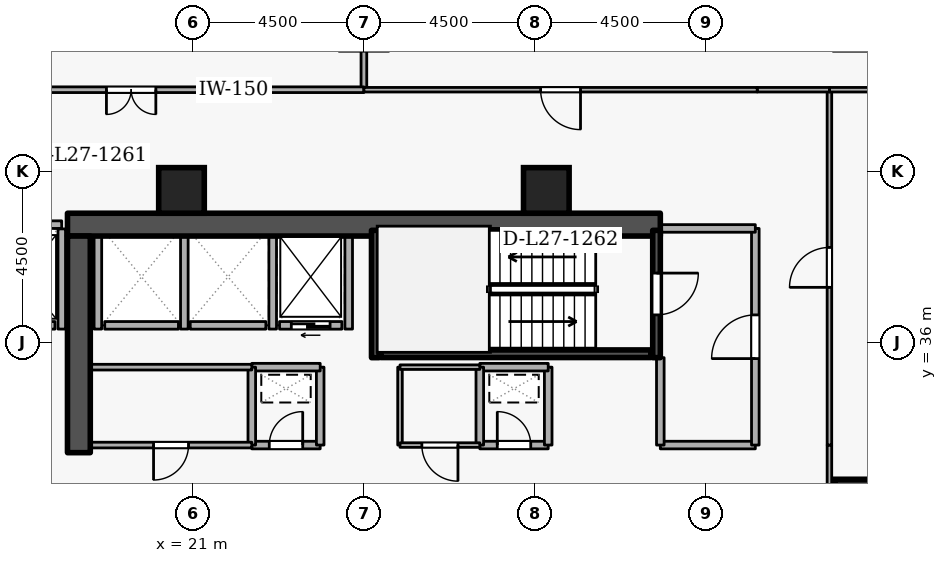
"""IFC4 building model, lengths in metres.
Left out: names, types, materials, properties, quantities, classifications, styles, units other than length and angle.
Written with IfcOpenShell. Run it as: python <this file> out.ifc"""

import sys

from ifc_helpers import new_model, si_unit, direction, frame, frame_2d, origin, origin_2d, place, context, subcontext, project, spatial, rectangle, extrude, element, fill, save


model = new_model("IFC4")
c1 = context("Model", 3, precision=1e-05, world=origin(), true_north=direction((0.0, 1.0)))
c2 = subcontext(c1, "Body", "Model", "MODEL_VIEW")
j1 = project(units=[si_unit("LENGTHUNIT", "METRE"), si_unit("PLANEANGLEUNIT", "RADIAN")], contexts=[c1])
p1 = place(None, origin())
s1 = spatial("IfcSite", under=j1, at=p1, CompositionType="ELEMENT")
p2 = place(p1, origin())
s2 = spatial("IfcBuilding", under=s1, at=p2, CompositionType="ELEMENT")
p3 = place(p2, frame((0.0, 0.0, 105.3)))
s3 = spatial("IfcBuildingStorey", under=s2, at=p3, CompositionType="ELEMENT", Elevation=105.3)
p4 = place(p3, frame((17.7, 39.1, 0.0), z_axis=(0.0, 0.0, 1.0), x_axis=(1.0, 0.0, 0.0)))
e1 = element("IfcWall", 1, at=p4, inside=s3, PredefinedType="SHEAR", context=c2, shape_type="SweptSolid", body=[
    extrude(rectangle(XDim=15.6, YDim=0.6, at=frame_2d((7.8, 0.0))), origin(), (0.0, 0.0, 1.0), 3.6),
])
p5 = place(p3, frame((18.0, 33.1, 0.0), z_axis=(0.0, 0.0, 1.0), x_axis=(0.0, 1.0, 0.0)))
e2 = element("IfcWall", 2, at=p5, inside=s3, PredefinedType="SHEAR", context=c2, shape_type="SweptSolid", body=[
    extrude(rectangle(XDim=5.7, YDim=0.6, at=frame_2d((2.85, 0.0))), origin(), (0.0, 0.0, 1.0), 3.6),
])
for number, where, z_axis, x_axis in (
    (3, (38.5, 31.8, 0.0), (0.0, 0.0, 1.0), (1.0, 0.0, 0.0)),
    (4, (20.7, 40.0, 0.0), (0.0, 0.0, 1.0), (1.0, 0.0, 0.0)),
    (5, (30.3, 40.0, 0.0), (0.0, 0.0, 1.0), (1.0, 0.0, 0.0)),
):
    element("IfcColumn", number, at=place(p3, frame(where, z_axis=z_axis, x_axis=x_axis)), inside=s3, PredefinedType="COLUMN", context=c2, shape_type="SweptSolid", body=[
        extrude(rectangle(XDim=1.2, YDim=1.2, at=origin_2d()), origin(), (0.0, 0.0, 1.0), 3.6),
    ])
p6 = place(p3, frame((24.92, 36.45, 0.0), z_axis=(0.0, 0.0, 1.0), x_axis=(-1.0, 0.0, 0.0)))
e6 = element("IfcWall", 6, at=p6, inside=s3, PredefinedType="STANDARD", context=c2, shape_type="SweptSolid", body=[
    extrude(rectangle(XDim=1.64, YDim=0.2, at=frame_2d((0.82, 0.0))), origin(), (0.0, 0.0, 1.0), 3.34),
])
p7 = place(p6, frame((0.31, 0.0, 0.0)))
e7 = element("IfcOpeningElement", 7, at=p7, cuts=e6, PredefinedType="OPENING", context=c2, shape_type="SweptSolid", body=[
    extrude(rectangle(XDim=1.02, YDim=2.06, at=frame_2d((0.51, 1.03))), frame((0.0, 0.11, 0.0), z_axis=(0.0, -1.0, 0.0), x_axis=(1.0, 0.0, 0.0)), (0.0, 0.0, 1.0), 0.22),
])
p8 = place(p3, frame((22.92, 36.45, 0.0), z_axis=(0.0, 0.0, 1.0), x_axis=(-1.0, 0.0, 0.0)))
e8 = element("IfcWall", 8, at=p8, inside=s3, PredefinedType="STANDARD", context=c2, shape_type="SweptSolid", body=[
    extrude(rectangle(XDim=1.99, YDim=0.2, at=frame_2d((0.995, 0.0))), origin(), (0.0, 0.0, 1.0), 3.34),
])
p9 = place(p3, frame((20.62, 36.45, 0.0), z_axis=(0.0, 0.0, 1.0), x_axis=(-1.0, 0.0, 0.0)))
e9 = element("IfcWall", 9, at=p9, inside=s3, PredefinedType="STANDARD", context=c2, shape_type="SweptSolid", body=[
    extrude(rectangle(XDim=1.94, YDim=0.2, at=frame_2d((0.97, 0.0))), origin(), (0.0, 0.0, 1.0), 3.34),
])
p10 = place(p3, frame((17.37, 36.45, 0.0), z_axis=(0.0, 0.0, 1.0), x_axis=(-1.0, 0.0, 0.0)))
e10 = element("IfcWall", 10, at=p10, inside=s3, PredefinedType="STANDARD", context=c2, shape_type="SweptSolid", body=[
    extrude(rectangle(XDim=1.74, YDim=0.2, at=frame_2d((0.87, 0.0))), origin(), (0.0, 0.0, 1.0), 3.34),
])
p11 = place(p10, frame((0.36, 0.0, 0.0)))
e11 = element("IfcOpeningElement", 11, at=p11, cuts=e10, PredefinedType="OPENING", context=c2, shape_type="SweptSolid", body=[
    extrude(rectangle(XDim=1.02, YDim=2.06, at=frame_2d((0.51, 1.03))), frame((0.0, 0.11, 0.0), z_axis=(0.0, -1.0, 0.0), x_axis=(1.0, 0.0, 0.0)), (0.0, 0.0, 1.0), 0.22),
])
for number, where, z_axis, x_axis in (
    (12, (25.1, 36.352, 0.0), (0.0, 0.0, 1.0), (0.0, 1.0, 0.0)),
    (13, (23.1, 36.352, 0.0), (0.0, 0.0, 1.0), (0.0, 1.0, 0.0)),
    (14, (20.775, 36.352, 0.0), (0.0, 0.0, 1.0), (0.0, 1.0, 0.0)),
    (15, (18.5, 36.352, 0.0), (0.0, 0.0, 1.0), (0.0, 1.0, 0.0)),
):
    element("IfcWall", number, at=place(p3, frame(where, z_axis=z_axis, x_axis=x_axis)), inside=s3, PredefinedType="STANDARD", context=c2, shape_type="SweptSolid", body=[
        extrude(rectangle(XDim=2.436, YDim=0.2, at=frame_2d((1.218, 0.0))), origin(), (0.0, 0.0, 1.0), 3.34),
    ])
p12 = place(p3, frame((13.352, 39.1, 0.0), z_axis=(0.0, 0.0, 1.0), x_axis=(1.0, 0.0, 0.0)))
e16 = element("IfcWall", 16, at=p12, inside=s3, PredefinedType="STANDARD", context=c2, shape_type="SweptSolid", body=[
    extrude(rectangle(XDim=4.196, YDim=0.2, at=frame_2d((2.098, 0.0))), origin(), (0.0, 0.0, 1.0), 3.34),
])
p13 = place(p3, frame((17.55, 36.352, 0.0), z_axis=(0.0, 0.0, 1.0), x_axis=(0.0, 1.0, 0.0)))
e17 = element("IfcWall", 17, at=p13, inside=s3, PredefinedType="STANDARD", context=c2, shape_type="SweptSolid", body=[
    extrude(rectangle(XDim=2.636, YDim=0.2, at=frame_2d((1.318, 0.0))), origin(), (0.0, 0.0, 1.0), 2.545),
])
p14 = place(p3, frame((33.2, 38.95, 0.0), z_axis=(0.0, 0.0, 1.0), x_axis=(0.0, -1.0, 0.0)))
e18 = element("IfcWall", 18, at=p14, inside=s3, PredefinedType="SHEAR", context=c2, shape_type="SweptSolid", body=[
    extrude(rectangle(XDim=3.35, YDim=0.2, at=frame_2d((1.675, 0.0))), origin(), (0.0, 0.0, 1.0), 3.6),
])
p15 = place(p14, frame((1.125, 0.0, 0.0)))
e19 = element("IfcOpeningElement", 19, at=p15, cuts=e18, PredefinedType="OPENING", context=c2, shape_type="SweptSolid", body=[
    extrude(rectangle(XDim=1.1, YDim=2.1, at=frame_2d((0.55, 1.05))), frame((0.0, 0.11, 0.0), z_axis=(0.0, -1.0, 0.0), x_axis=(1.0, 0.0, 0.0)), (0.0, 0.0, 1.0), 0.22),
])
p16 = place(p3, frame((25.8, 35.6, 0.0), z_axis=(0.0, 0.0, 1.0), x_axis=(0.0, 1.0, 0.0)))
e20 = element("IfcWall", 20, at=p16, inside=s3, PredefinedType="SHEAR", context=c2, shape_type="SweptSolid", body=[
    extrude(rectangle(XDim=3.35, YDim=0.2, at=frame_2d((1.675, 0.0))), origin(), (0.0, 0.0, 1.0), 3.6),
])
p17 = place(p3, frame((25.95, 35.703, 0.0), z_axis=(0.0, 0.0, 1.0), x_axis=(1.0, 0.0, 0.0)))
e21 = element("IfcWall", 21, at=p17, inside=s3, PredefinedType="SHEAR", context=c2, shape_type="SweptSolid", body=[
    extrude(rectangle(XDim=7.1, YDim=0.2, at=frame_2d((3.55, 0.0))), origin(), (0.0, 0.0, 1.0), 3.6),
])
p18 = place(p3, frame((33.3, 33.3, 0.0), z_axis=(0.0, 0.0, 1.0), x_axis=(1.0, 0.0, 0.0)))
e22 = element("IfcWall", 22, at=p18, inside=s3, PredefinedType="STANDARD", context=c2, shape_type="SweptSolid", body=[
    extrude(rectangle(XDim=2.5, YDim=0.2, at=frame_2d((1.25, 0.0))), origin(), (0.0, 0.0, 1.0), 3.34),
])
p19 = place(p3, frame((35.8, 33.3, 0.0), z_axis=(0.0, 0.0, 1.0), x_axis=(0.0, 1.0, 0.0)))
e23 = element("IfcWall", 23, at=p19, inside=s3, PredefinedType="STANDARD", context=c2, shape_type="SweptSolid", body=[
    extrude(rectangle(XDim=5.7, YDim=0.2, at=frame_2d((2.85, 0.0))), origin(), (0.0, 0.0, 1.0), 3.34),
])
p20 = place(p19, frame((2.275, 0.0, 0.0)))
e24 = element("IfcOpeningElement", 24, at=p20, cuts=e23, PredefinedType="OPENING", context=c2, shape_type="SweptSolid", body=[
    extrude(rectangle(XDim=1.15, YDim=2.1, at=frame_2d((0.575, 1.05))), frame((0.0, 0.11, 0.0), z_axis=(0.0, -1.0, 0.0), x_axis=(1.0, 0.0, 0.0)), (0.0, 0.0, 1.0), 0.22),
])
p21 = place(p3, frame((35.8, 39.0, 0.0), z_axis=(0.0, 0.0, 1.0), x_axis=(-1.0, 0.0, 0.0)))
e25 = element("IfcWall", 25, at=p21, inside=s3, PredefinedType="STANDARD", context=c2, shape_type="SweptSolid", body=[
    extrude(rectangle(XDim=2.5, YDim=0.2, at=frame_2d((1.25, 0.0))), origin(), (0.0, 0.0, 1.0), 3.34),
])
p22 = place(p3, frame((33.3, 35.6, 0.0), z_axis=(0.0, 0.0, 1.0), x_axis=(0.0, -1.0, 0.0)))
e26 = element("IfcWall", 26, at=p22, inside=s3, PredefinedType="STANDARD", context=c2, shape_type="SweptSolid", body=[
    extrude(rectangle(XDim=2.3, YDim=0.2, at=frame_2d((1.15, 0.0))), origin(), (0.0, 0.0, 1.0), 2.545),
])
p23 = place(p3, frame((22.55, 33.3, 0.0), z_axis=(0.0, 0.0, 1.0), x_axis=(1.0, 0.0, 0.0)))
e27 = element("IfcWall", 27, at=p23, inside=s3, PredefinedType="STANDARD", context=c2, shape_type="SweptSolid", body=[
    extrude(rectangle(XDim=1.8, YDim=0.2, at=frame_2d((0.9, 0.0))), origin(), (0.0, 0.0, 1.0), 3.34),
])
p24 = place(p23, frame((0.46, 0.0, 0.0)))
e28 = element("IfcOpeningElement", 28, at=p24, cuts=e27, PredefinedType="OPENING", context=c2, shape_type="SweptSolid", body=[
    extrude(rectangle(XDim=0.88, YDim=2.04, at=frame_2d((0.44, 1.02))), frame((0.0, 0.11, 0.0), z_axis=(0.0, -1.0, 0.0), x_axis=(1.0, 0.0, 0.0)), (0.0, 0.0, 1.0), 0.22),
])
p25 = place(p3, frame((24.35, 33.3, 0.0), z_axis=(0.0, 0.0, 1.0), x_axis=(0.0, 1.0, 0.0)))
e29 = element("IfcWall", 29, at=p25, inside=s3, PredefinedType="STANDARD", context=c2, shape_type="SweptSolid", body=[
    extrude(rectangle(XDim=2.05, YDim=0.2, at=frame_2d((1.025, 0.0))), origin(), (0.0, 0.0, 1.0), 3.34),
])
p26 = place(p3, frame((24.35, 35.35, 0.0), z_axis=(0.0, 0.0, 1.0), x_axis=(-1.0, 0.0, 0.0)))
e30 = element("IfcWall", 30, at=p26, inside=s3, PredefinedType="STANDARD", context=c2, shape_type="SweptSolid", body=[
    extrude(rectangle(XDim=1.8, YDim=0.2, at=frame_2d((0.9, 0.0))), origin(), (0.0, 0.0, 1.0), 3.34),
])
p27 = place(p3, frame((22.55, 35.35, 0.0), z_axis=(0.0, 0.0, 1.0), x_axis=(0.0, -1.0, 0.0)))
e31 = element("IfcWall", 31, at=p27, inside=s3, PredefinedType="STANDARD", context=c2, shape_type="SweptSolid", body=[
    extrude(rectangle(XDim=2.05, YDim=0.2, at=frame_2d((1.025, 0.0))), origin(), (0.0, 0.0, 1.0), 3.34),
])
p28 = place(p3, frame((28.55, 33.3, 0.0), z_axis=(0.0, 0.0, 1.0), x_axis=(1.0, 0.0, 0.0)))
e32 = element("IfcWall", 32, at=p28, inside=s3, PredefinedType="STANDARD", context=c2, shape_type="SweptSolid", body=[
    extrude(rectangle(XDim=1.8, YDim=0.2, at=frame_2d((0.9, 0.0))), origin(), (0.0, 0.0, 1.0), 3.34),
])
p29 = place(p28, frame((0.46, 0.0, 0.0)))
e33 = element("IfcOpeningElement", 33, at=p29, cuts=e32, PredefinedType="OPENING", context=c2, shape_type="SweptSolid", body=[
    extrude(rectangle(XDim=0.88, YDim=2.04, at=frame_2d((0.44, 1.02))), frame((0.0, 0.11, 0.0), z_axis=(0.0, -1.0, 0.0), x_axis=(1.0, 0.0, 0.0)), (0.0, 0.0, 1.0), 0.22),
])
p30 = place(p3, frame((30.35, 33.3, 0.0), z_axis=(0.0, 0.0, 1.0), x_axis=(0.0, 1.0, 0.0)))
e34 = element("IfcWall", 34, at=p30, inside=s3, PredefinedType="STANDARD", context=c2, shape_type="SweptSolid", body=[
    extrude(rectangle(XDim=2.05, YDim=0.2, at=frame_2d((1.025, 0.0))), origin(), (0.0, 0.0, 1.0), 3.34),
])
p31 = place(p3, frame((30.35, 35.35, 0.0), z_axis=(0.0, 0.0, 1.0), x_axis=(-1.0, 0.0, 0.0)))
e35 = element("IfcWall", 35, at=p31, inside=s3, PredefinedType="STANDARD", context=c2, shape_type="SweptSolid", body=[
    extrude(rectangle(XDim=1.8, YDim=0.2, at=frame_2d((0.9, 0.0))), origin(), (0.0, 0.0, 1.0), 3.34),
])
p32 = place(p3, frame((28.55, 35.35, 0.0), z_axis=(0.0, 0.0, 1.0), x_axis=(0.0, -1.0, 0.0)))
e36 = element("IfcWall", 36, at=p32, inside=s3, PredefinedType="STANDARD", context=c2, shape_type="SweptSolid", body=[
    extrude(rectangle(XDim=2.05, YDim=0.2, at=frame_2d((1.025, 0.0))), origin(), (0.0, 0.0, 1.0), 3.34),
])
p33 = place(p3, frame((18.3, 35.35, 0.0), z_axis=(0.0, 0.0, 1.0), x_axis=(1.0, 0.0, 0.0)))
e37 = element("IfcWall", 37, at=p33, inside=s3, PredefinedType="PARTITIONING", context=c2, shape_type="SweptSolid", body=[
    extrude(rectangle(XDim=4.25, YDim=0.15, at=frame_2d((2.125, 0.0))), origin(), (0.0, 0.0, 1.0), 3.34),
])
p34 = place(p3, frame((22.55, 33.3, 0.0), z_axis=(0.0, 0.0, 1.0), x_axis=(-1.0, 0.0, 0.0)))
e38 = element("IfcWall", 38, at=p34, inside=s3, PredefinedType="PARTITIONING", context=c2, shape_type="SweptSolid", body=[
    extrude(rectangle(XDim=4.25, YDim=0.15, at=frame_2d((2.125, 0.0))), origin(), (0.0, 0.0, 1.0), 3.34),
])
p35 = place(p34, frame((1.665, 0.0, 0.0)))
e39 = element("IfcOpeningElement", 39, at=p35, cuts=e38, PredefinedType="OPENING", context=c2, shape_type="SweptSolid", body=[
    extrude(rectangle(XDim=0.92, YDim=2.08, at=frame_2d((0.46, 1.04))), frame((0.0, 0.085, 0.0), z_axis=(0.0, -1.0, 0.0), x_axis=(1.0, 0.0, 0.0)), (0.0, 0.0, 1.0), 0.17),
])
p36 = place(p3, frame((26.45, 33.3, 0.0), z_axis=(0.0, 0.0, 1.0), x_axis=(0.0, 1.0, 0.0)))
e40 = element("IfcWall", 40, at=p36, inside=s3, PredefinedType="PARTITIONING", context=c2, shape_type="SweptSolid", body=[
    extrude(rectangle(XDim=2.05, YDim=0.12, at=frame_2d((1.025, 0.0))), origin(), (0.0, 0.0, 1.0), 3.34),
])
p37 = place(p3, frame((26.45, 35.35, 0.0), z_axis=(0.0, 0.0, 1.0), x_axis=(1.0, 0.0, 0.0)))
e41 = element("IfcWall", 41, at=p37, inside=s3, PredefinedType="PARTITIONING", context=c2, shape_type="SweptSolid", body=[
    extrude(rectangle(XDim=2.1, YDim=0.12, at=frame_2d((1.05, 0.0))), origin(), (0.0, 0.0, 1.0), 3.34),
])
p38 = place(p3, frame((28.55, 33.3, 0.0), z_axis=(0.0, 0.0, 1.0), x_axis=(-1.0, 0.0, 0.0)))
e42 = element("IfcWall", 42, at=p38, inside=s3, PredefinedType="PARTITIONING", context=c2, shape_type="SweptSolid", body=[
    extrude(rectangle(XDim=2.1, YDim=0.12, at=frame_2d((1.05, 0.0))), origin(), (0.0, 0.0, 1.0), 3.34),
])
p39 = place(p38, frame((0.575, 0.0, 0.0)))
e43 = element("IfcOpeningElement", 43, at=p39, cuts=e42, PredefinedType="OPENING", context=c2, shape_type="SweptSolid", body=[
    extrude(rectangle(XDim=0.95, YDim=2.1, at=frame_2d((0.475, 1.05))), frame((0.0, 0.07, 0.0), z_axis=(0.0, -1.0, 0.0), x_axis=(1.0, 0.0, 0.0)), (0.0, 0.0, 1.0), 0.14),
])
p40 = place(p3, frame((37.75, 31.45, 0.0), z_axis=(0.0, 0.0, 1.0), x_axis=(0.0, 1.0, 0.0)))
e44 = element("IfcWall", 44, at=p40, inside=s3, PredefinedType="PARTITIONING", context=c2, shape_type="SweptSolid", body=[
    extrude(rectangle(XDim=1.85, YDim=0.12, at=frame_2d((0.925, 0.0))), origin(), (0.0, 0.0, 1.0), 3.34),
])
p41 = place(p3, frame((37.75, 33.3, 0.0), z_axis=(0.0, 0.0, 1.0), x_axis=(0.0, 1.0, 0.0)))
e45 = element("IfcWall", 45, at=p41, inside=s3, PredefinedType="PARTITIONING", context=c2, shape_type="SweptSolid", body=[
    extrude(rectangle(XDim=9.35, YDim=0.12, at=frame_2d((4.675, 0.0))), origin(), (0.0, 0.0, 1.0), 3.34),
])
p42 = place(p41, frame((4.15, 0.0, 0.0)))
e46 = element("IfcOpeningElement", 46, at=p42, cuts=e45, PredefinedType="OPENING", context=c2, shape_type="SweptSolid", body=[
    extrude(rectangle(XDim=1.05, YDim=2.1, at=frame_2d((0.525, 1.05))), frame((0.0, 0.07, 0.0), z_axis=(0.0, -1.0, 0.0), x_axis=(1.0, 0.0, 0.0)), (0.0, 0.0, 1.0), 0.14),
])
p43 = place(p3, frame((37.75, 42.65, 0.0), z_axis=(0.0, 0.0, 1.0), x_axis=(1.0, 0.0, 0.0)))
e47 = element("IfcWall", 47, at=p43, inside=s3, PredefinedType="PARTITIONING", context=c2, shape_type="SweptSolid", body=[
    extrude(rectangle(XDim=5.67, YDim=0.12, at=frame_2d((2.835, 0.0))), origin(), (0.0, 0.0, 1.0), 3.34),
])
p44 = place(p3, frame((25.5, 50.92, 0.0), z_axis=(0.0, 0.0, 1.0), x_axis=(0.0, -1.0, 0.0)))
e48 = element("IfcWall", 48, at=p44, inside=s3, PredefinedType="PARTITIONING", context=c2, shape_type="SweptSolid", body=[
    extrude(rectangle(XDim=8.27, YDim=0.15, at=frame_2d((4.135, 0.0))), origin(), (0.0, 0.0, 1.0), 2.878),
])
p45 = place(p3, frame((25.5, 42.65, 0.0), z_axis=(0.0, 0.0, 1.0), x_axis=(-1.0, 0.0, 0.0)))
e49 = element("IfcWall", 49, at=p45, inside=s3, PredefinedType="PARTITIONING", context=c2, shape_type="SweptSolid", body=[
    extrude(rectangle(XDim=12.25, YDim=0.15, at=frame_2d((6.125, 0.0))), origin(), (0.0, 0.0, 1.0), 3.34),
])
p46 = place(p45, frame((5.475, 0.0, 0.0)))
e50 = element("IfcOpeningElement", 50, at=p46, cuts=e49, PredefinedType="OPENING", context=c2, shape_type="SweptSolid", body=[
    extrude(rectangle(XDim=1.3, YDim=2.12, at=frame_2d((0.65, 1.06))), frame((0.0, 0.085, 0.0), z_axis=(0.0, -1.0, 0.0), x_axis=(1.0, 0.0, 0.0)), (0.0, 0.0, 1.0), 0.17),
])
p47 = place(p3, frame((37.75, 42.65, 0.0), z_axis=(0.0, 0.0, 1.0), x_axis=(-1.0, 0.0, 0.0)))
e51 = element("IfcWall", 51, at=p47, inside=s3, PredefinedType="PARTITIONING", context=c2, shape_type="SweptSolid", body=[
    extrude(rectangle(XDim=1.9, YDim=0.12, at=frame_2d((0.95, 0.0))), origin(), (0.0, 0.0, 1.0), 3.34),
])
p48 = place(p3, frame((35.85, 42.65, 0.0), z_axis=(0.0, 0.0, 1.0), x_axis=(-1.0, 0.0, 0.0)))
e52 = element("IfcWall", 52, at=p48, inside=s3, PredefinedType="PARTITIONING", context=c2, shape_type="SweptSolid", body=[
    extrude(rectangle(XDim=10.35, YDim=0.12, at=frame_2d((5.175, 0.0))), origin(), (0.0, 0.0, 1.0), 2.895),
])
p49 = place(p48, frame((4.65, 0.0, 0.0)))
e53 = element("IfcOpeningElement", 53, at=p49, cuts=e52, PredefinedType="OPENING", context=c2, shape_type="SweptSolid", body=[
    extrude(rectangle(XDim=1.05, YDim=2.1, at=frame_2d((0.525, 1.05))), frame((0.0, 0.07, 0.0), z_axis=(0.0, -1.0, 0.0), x_axis=(1.0, 0.0, 0.0)), (0.0, 0.0, 1.0), 0.14),
])
p50 = place(p7, origin())
e54 = element("IfcDoor", 54, at=p50, inside=s3, OperationType="SLIDING_TO_LEFT", PredefinedType="DOOR", context=c2, shape_type="SweptSolid", body=[
    extrude(rectangle(XDim=1.02, YDim=2.06, at=frame_2d((0.51, 1.03))), frame((0.0, 0.025, 0.0), z_axis=(0.0, -1.0, 0.0), x_axis=(1.0, 0.0, 0.0)), (0.0, 0.0, 1.0), 0.05),
])
fill(e7, e54)
p51 = place(p15, origin())
e55 = element("IfcDoor", 55, at=p51, inside=s3, OperationType="SINGLE_SWING_LEFT", PredefinedType="DOOR", context=c2, shape_type="SweptSolid", body=[
    extrude(rectangle(XDim=1.1, YDim=2.1, at=frame_2d((0.55, 1.05))), frame((0.0, 0.025, 0.0), z_axis=(0.0, -1.0, 0.0), x_axis=(1.0, 0.0, 0.0)), (0.0, 0.0, 1.0), 0.05),
])
fill(e19, e55)
p52 = place(p20, origin())
e56 = element("IfcDoor", 56, at=p52, inside=s3, OperationType="SINGLE_SWING_LEFT", PredefinedType="DOOR", context=c2, shape_type="SweptSolid", body=[
    extrude(rectangle(XDim=1.15, YDim=2.1, at=frame_2d((0.575, 1.05))), frame((0.0, 0.025, 0.0), z_axis=(0.0, -1.0, 0.0), x_axis=(1.0, 0.0, 0.0)), (0.0, 0.0, 1.0), 0.05),
])
fill(e24, e56)
p53 = place(p24, origin())
e57 = element("IfcDoor", 57, at=p53, inside=s3, OperationType="SINGLE_SWING_RIGHT", PredefinedType="DOOR", context=c2, shape_type="SweptSolid", body=[
    extrude(rectangle(XDim=0.88, YDim=2.04, at=frame_2d((0.44, 1.02))), frame((0.0, 0.025, 0.0), z_axis=(0.0, -1.0, 0.0), x_axis=(1.0, 0.0, 0.0)), (0.0, 0.0, 1.0), 0.05),
])
fill(e28, e57)
p54 = place(p29, origin())
e58 = element("IfcDoor", 58, at=p54, inside=s3, OperationType="SINGLE_SWING_LEFT", PredefinedType="DOOR", context=c2, shape_type="SweptSolid", body=[
    extrude(rectangle(XDim=0.88, YDim=2.04, at=frame_2d((0.44, 1.02))), frame((0.0, 0.025, 0.0), z_axis=(0.0, -1.0, 0.0), x_axis=(1.0, 0.0, 0.0)), (0.0, 0.0, 1.0), 0.05),
])
fill(e33, e58)
p55 = place(p35, origin())
e59 = element("IfcDoor", 59, at=p55, inside=s3, OperationType="SINGLE_SWING_RIGHT", PredefinedType="DOOR", context=c2, shape_type="SweptSolid", body=[
    extrude(rectangle(XDim=0.92, YDim=2.08, at=frame_2d((0.46, 1.04))), frame((0.0, 0.025, 0.0), z_axis=(0.0, -1.0, 0.0), x_axis=(1.0, 0.0, 0.0)), (0.0, 0.0, 1.0), 0.05),
])
fill(e39, e59)
p56 = place(p39, origin())
e60 = element("IfcDoor", 60, at=p56, inside=s3, OperationType="SINGLE_SWING_LEFT", PredefinedType="DOOR", context=c2, shape_type="SweptSolid", body=[
    extrude(rectangle(XDim=0.95, YDim=2.1, at=frame_2d((0.475, 1.05))), frame((0.0, 0.025, 0.0), z_axis=(0.0, -1.0, 0.0), x_axis=(1.0, 0.0, 0.0)), (0.0, 0.0, 1.0), 0.05),
])
fill(e43, e60)
p57 = place(p42, origin())
e61 = element("IfcDoor", 61, at=p57, inside=s3, OperationType="SINGLE_SWING_LEFT", PredefinedType="DOOR", context=c2, shape_type="SweptSolid", body=[
    extrude(rectangle(XDim=1.05, YDim=2.1, at=frame_2d((0.525, 1.05))), frame((0.0, 0.025, 0.0), z_axis=(0.0, -1.0, 0.0), x_axis=(1.0, 0.0, 0.0)), (0.0, 0.0, 1.0), 0.05),
])
fill(e46, e61)
p58 = place(p46, origin())
e62 = element("IfcDoor", 62, at=p58, inside=s3, OperationType="DOUBLE_DOOR_SINGLE_SWING", PredefinedType="DOOR", context=c2, shape_type="SweptSolid", body=[
    extrude(rectangle(XDim=1.3, YDim=2.12, at=frame_2d((0.65, 1.06))), frame((0.0, 0.025, 0.0), z_axis=(0.0, -1.0, 0.0), x_axis=(1.0, 0.0, 0.0)), (0.0, 0.0, 1.0), 0.05),
])
fill(e50, e62)
p59 = place(p49, origin())
e63 = element("IfcDoor", 63, at=p59, inside=s3, OperationType="SINGLE_SWING_LEFT", PredefinedType="DOOR", context=c2, shape_type="SweptSolid", body=[
    extrude(rectangle(XDim=1.05, YDim=2.1, at=frame_2d((0.525, 1.05))), frame((0.0, 0.025, 0.0), z_axis=(0.0, -1.0, 0.0), x_axis=(1.0, 0.0, 0.0)), (0.0, 0.0, 1.0), 0.05),
])
fill(e53, e63)
save(model, sys.argv[1])
